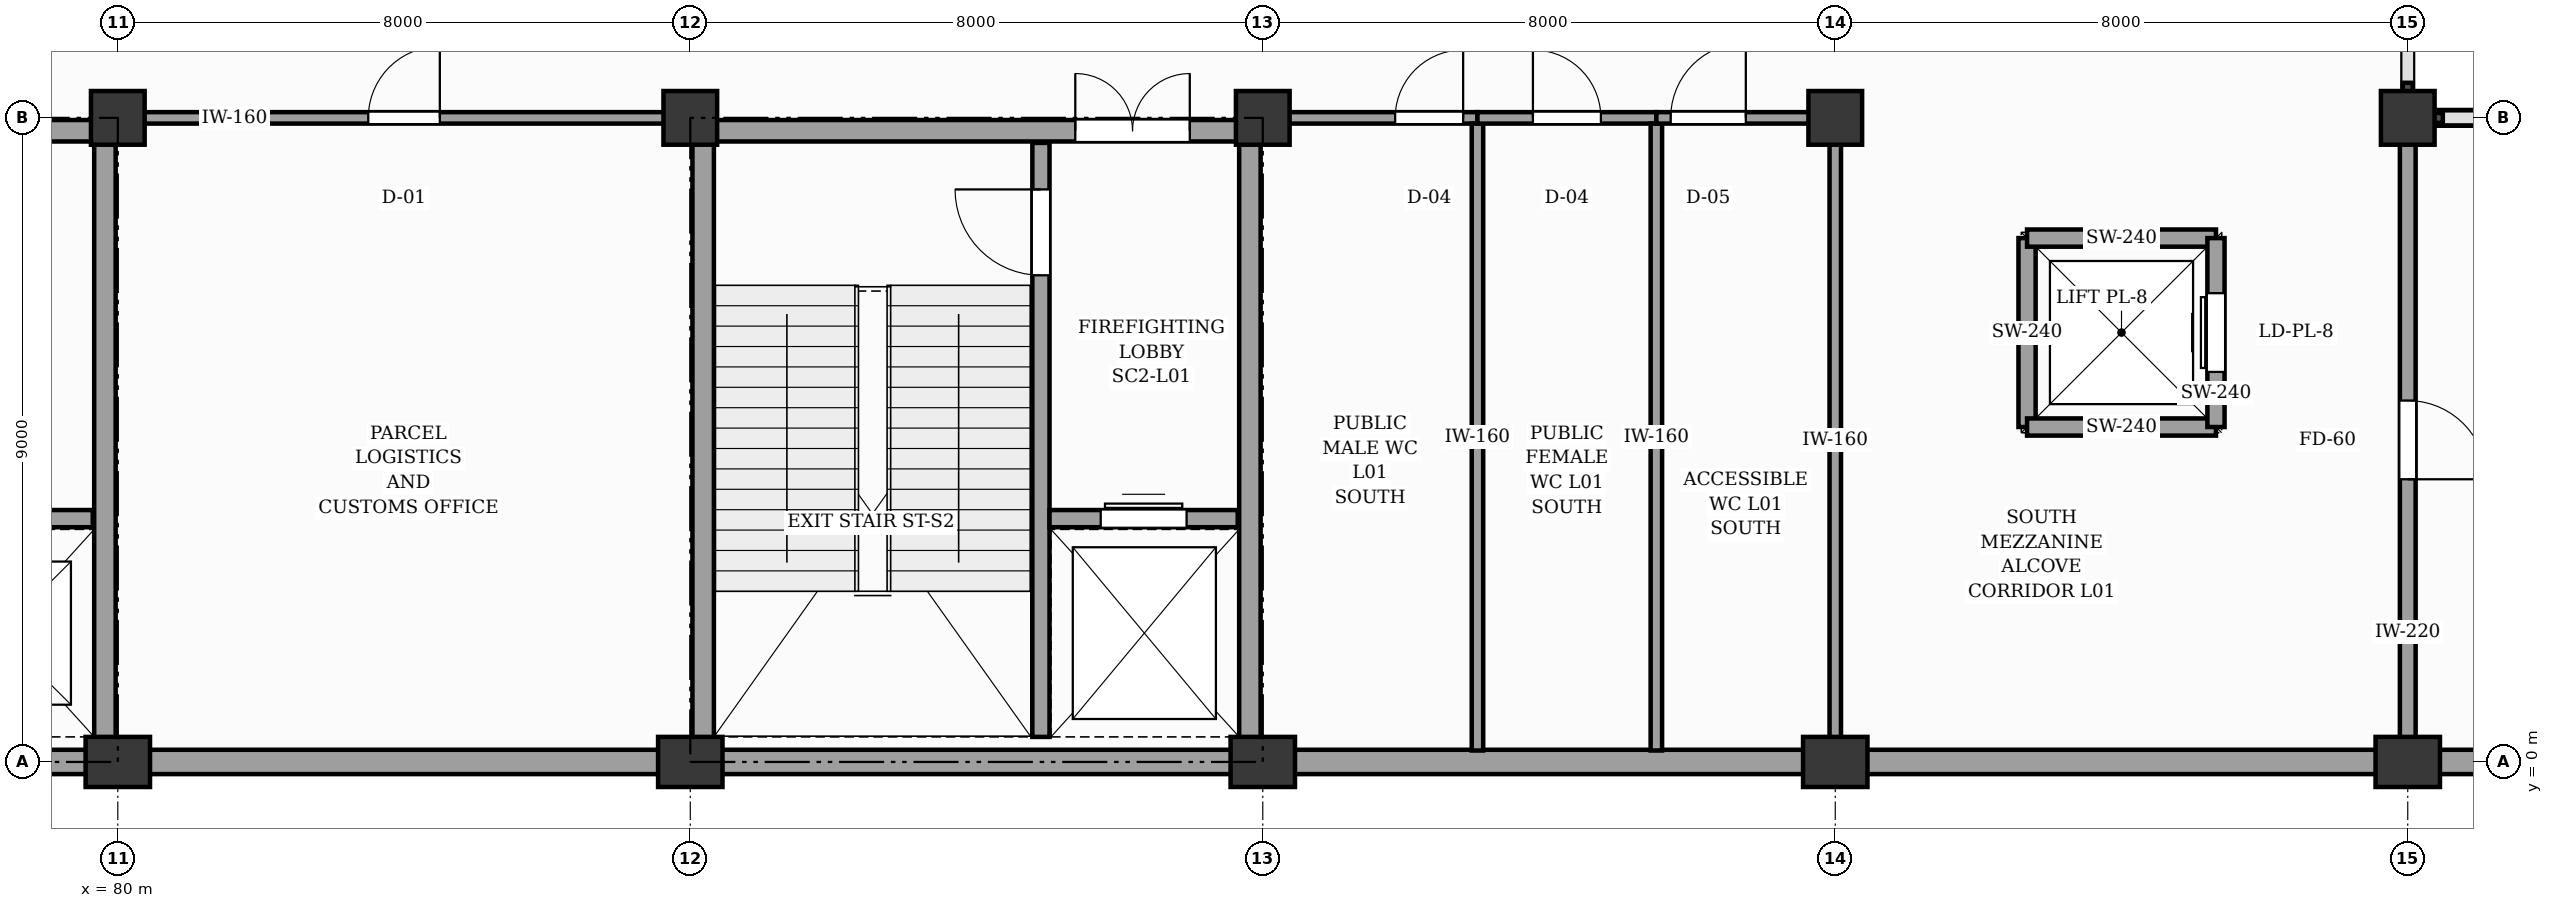
"""IFC4 building model, lengths in metres.
Left out: names, types, materials, properties, quantities, classifications, styles, units other than length and angle.
Written with IfcOpenShell. Run it as: python <this file> out.ifc"""

import sys

from ifc_helpers import new_model, si_unit, direction, frame, frame_2d, origin, origin_2d, place, context, subcontext, project, spatial, rectangle, extrude, element, fill, save


model = new_model("IFC4")
c1 = context("Model", 3, precision=1e-05, world=origin(), true_north=direction((0.0, 1.0)))
c2 = subcontext(c1, "Body", "Model", "MODEL_VIEW")
j1 = project(units=[si_unit("LENGTHUNIT", "METRE"), si_unit("PLANEANGLEUNIT", "RADIAN")], contexts=[c1])
p1 = place(None, origin())
s1 = spatial("IfcSite", under=j1, at=p1, CompositionType="ELEMENT")
p2 = place(p1, origin())
s2 = spatial("IfcBuilding", under=s1, at=p2, CompositionType="ELEMENT")
p3 = place(p2, frame((0.0, 0.0, 4.8)))
s3 = spatial("IfcBuildingStorey", under=s2, at=p3, CompositionType="ELEMENT", Elevation=4.8)
p4 = place(p3, frame((80.0, 0.0, 0.0), z_axis=(0.0, 0.0, 1.0), x_axis=(1.0, 0.0, 0.0)))
e1 = element("IfcColumn", 1, at=p4, inside=s3, PredefinedType="PILASTER", context=c2, shape_type="SweptSolid", body=[
    extrude(rectangle(XDim=0.9, YDim=0.7, at=origin_2d()), origin(), (0.0, 0.0, 1.0), 4.8),
])
p5 = place(p3, frame((80.0, 9.0, 0.0), z_axis=(0.0, 0.0, 1.0), x_axis=(1.0, 0.0, 0.0)))
e2 = element("IfcColumn", 2, at=p5, inside=s3, PredefinedType="COLUMN", context=c2, shape_type="SweptSolid", body=[
    extrude(rectangle(XDim=0.75, YDim=0.75, at=origin_2d()), origin(), (0.0, 0.0, 1.0), 4.8),
])
p6 = place(p3, frame((88.0, 0.0, 0.0), z_axis=(0.0, 0.0, 1.0), x_axis=(1.0, 0.0, 0.0)))
e3 = element("IfcColumn", 3, at=p6, inside=s3, PredefinedType="PILASTER", context=c2, shape_type="SweptSolid", body=[
    extrude(rectangle(XDim=0.9, YDim=0.7, at=origin_2d()), origin(), (0.0, 0.0, 1.0), 4.8),
])
p7 = place(p3, frame((88.0, 9.0, 0.0), z_axis=(0.0, 0.0, 1.0), x_axis=(1.0, 0.0, 0.0)))
e4 = element("IfcColumn", 4, at=p7, inside=s3, PredefinedType="COLUMN", context=c2, shape_type="SweptSolid", body=[
    extrude(rectangle(XDim=0.75, YDim=0.75, at=origin_2d()), origin(), (0.0, 0.0, 1.0), 4.8),
])
p8 = place(p3, frame((96.0, 0.0, 0.0), z_axis=(0.0, 0.0, 1.0), x_axis=(1.0, 0.0, 0.0)))
e5 = element("IfcColumn", 5, at=p8, inside=s3, PredefinedType="PILASTER", context=c2, shape_type="SweptSolid", body=[
    extrude(rectangle(XDim=0.9, YDim=0.7, at=origin_2d()), origin(), (0.0, 0.0, 1.0), 4.8),
])
p9 = place(p3, frame((96.0, 9.0, 0.0), z_axis=(0.0, 0.0, 1.0), x_axis=(1.0, 0.0, 0.0)))
e6 = element("IfcColumn", 6, at=p9, inside=s3, PredefinedType="COLUMN", context=c2, shape_type="SweptSolid", body=[
    extrude(rectangle(XDim=0.75, YDim=0.75, at=origin_2d()), origin(), (0.0, 0.0, 1.0), 4.8),
])
p10 = place(p3, frame((104.0, 0.0, 0.0), z_axis=(0.0, 0.0, 1.0), x_axis=(1.0, 0.0, 0.0)))
e7 = element("IfcColumn", 7, at=p10, inside=s3, PredefinedType="PILASTER", context=c2, shape_type="SweptSolid", body=[
    extrude(rectangle(XDim=0.9, YDim=0.7, at=origin_2d()), origin(), (0.0, 0.0, 1.0), 4.8),
])
p11 = place(p3, frame((104.0, 9.0, 0.0), z_axis=(0.0, 0.0, 1.0), x_axis=(1.0, 0.0, 0.0)))
e8 = element("IfcColumn", 8, at=p11, inside=s3, PredefinedType="COLUMN", context=c2, shape_type="SweptSolid", body=[
    extrude(rectangle(XDim=0.75, YDim=0.75, at=origin_2d()), origin(), (0.0, 0.0, 1.0), 4.8),
])
p12 = place(p3, frame((112.0, 0.0, 0.0), z_axis=(0.0, 0.0, 1.0), x_axis=(1.0, 0.0, 0.0)))
e9 = element("IfcColumn", 9, at=p12, inside=s3, PredefinedType="PILASTER", context=c2, shape_type="SweptSolid", body=[
    extrude(rectangle(XDim=0.9, YDim=0.7, at=origin_2d()), origin(), (0.0, 0.0, 1.0), 4.8),
])
p13 = place(p3, frame((112.0, 9.0, 0.0), z_axis=(0.0, 0.0, 1.0), x_axis=(1.0, 0.0, 0.0)))
e10 = element("IfcColumn", 10, at=p13, inside=s3, PredefinedType="COLUMN", context=c2, shape_type="SweptSolid", body=[
    extrude(rectangle(XDim=0.75, YDim=0.75, at=origin_2d()), origin(), (0.0, 0.0, 1.0), 4.8),
])
for number, where, z_axis, x_axis in (
    (11, (72.4, 0.0, 0.0), (0.0, 0.0, 1.0), (1.0, 0.0, 0.0)),
    (12, (80.4, 0.0, 0.0), (0.0, 0.0, 1.0), (1.0, 0.0, 0.0)),
    (13, (88.4, 0.0, 0.0), (0.0, 0.0, 1.0), (1.0, 0.0, 0.0)),
    (14, (96.4, 0.0, 0.0), (0.0, 0.0, 1.0), (1.0, 0.0, 0.0)),
    (15, (104.4, 0.0, 0.0), (0.0, 0.0, 1.0), (1.0, 0.0, 0.0)),
):
    element("IfcWall", number, at=place(p3, frame(where, z_axis=z_axis, x_axis=x_axis)), inside=s3, PredefinedType="SOLIDWALL", context=c2, shape_type="SweptSolid", body=[
        extrude(rectangle(XDim=7.2, YDim=0.34, at=frame_2d((3.6, 0.0))), origin(), (0.0, 0.0, 1.0), 3.84),
    ])
p14 = place(p3, frame((112.4, 0.0, 0.0), z_axis=(0.0, 0.0, 1.0), x_axis=(1.0, 0.0, 0.0)))
e16 = element("IfcWall", 16, at=p14, inside=s3, PredefinedType="SOLIDWALL", context=c2, shape_type="SweptSolid", body=[
    extrude(rectangle(XDim=7.2, YDim=0.34, at=frame_2d((3.6, 0.0))), origin(), (0.0, 0.0, 1.0), 3.08),
])
p15 = place(p3, frame((92.9, 0.35, 0.0), z_axis=(0.0, 0.0, 1.0), x_axis=(0.0, 1.0, 0.0)))
e17 = element("IfcWall", 17, at=p15, inside=s3, PredefinedType="SHEAR", context=c2, shape_type="SweptSolid", body=[
    extrude(rectangle(XDim=8.3, YDim=0.24, at=frame_2d((4.15, 0.0))), origin(), (0.0, 0.0, 1.0), 4.52),
])
p16 = place(p15, frame((6.45, 0.0, 0.0)))
e18 = element("IfcOpeningElement", 18, at=p16, cuts=e17, PredefinedType="OPENING", context=c2, shape_type="SweptSolid", body=[
    extrude(rectangle(XDim=1.2, YDim=2.15, at=frame_2d((0.6, 1.075))), frame((0.0, 0.13, 0.0), z_axis=(0.0, -1.0, 0.0), x_axis=(1.0, 0.0, 0.0)), (0.0, 0.0, 1.0), 0.26),
])
p17 = place(p3, frame((93.02, 3.4, 0.0), z_axis=(0.0, 0.0, 1.0), x_axis=(1.0, 0.0, 0.0)))
e19 = element("IfcWall", 19, at=p17, inside=s3, PredefinedType="SHEAR", context=c2, shape_type="SweptSolid", body=[
    extrude(rectangle(XDim=2.63, YDim=0.24, at=frame_2d((1.315, 0.0))), origin(), (0.0, 0.0, 1.0), 4.52),
])
p18 = place(p17, frame((0.715, 0.0, 0.0)))
e20 = element("IfcOpeningElement", 20, at=p18, cuts=e19, PredefinedType="OPENING", context=c2, shape_type="SweptSolid", body=[
    extrude(rectangle(XDim=1.2, YDim=2.15, at=frame_2d((0.6, 1.075))), frame((0.0, 0.13, 0.0), z_axis=(0.0, -1.0, 0.0), x_axis=(1.0, 0.0, 0.0)), (0.0, 0.0, 1.0), 0.26),
])
for number, where, z_axis, x_axis in (
    (21, (88.18, 0.18, 0.0), (0.0, 0.0, 1.0), (0.0, 1.0, 0.0)),
    (22, (95.82, 0.18, 0.0), (0.0, 0.0, 1.0), (0.0, 1.0, 0.0)),
):
    element("IfcWall", number, at=place(p3, frame(where, z_axis=z_axis, x_axis=x_axis)), inside=s3, PredefinedType="SHEAR", context=c2, shape_type="SweptSolid", body=[
        extrude(rectangle(XDim=8.64, YDim=0.3, at=frame_2d((4.32, 0.0))), origin(), (0.0, 0.0, 1.0), 4.52),
    ])
p19 = place(p3, frame((88.03, 8.82, 0.0), z_axis=(0.0, 0.0, 1.0), x_axis=(1.0, 0.0, 0.0)))
e23 = element("IfcWall", 23, at=p19, inside=s3, PredefinedType="SHEAR", context=c2, shape_type="SweptSolid", body=[
    extrude(rectangle(XDim=7.94, YDim=0.3, at=frame_2d((3.97, 0.0))), origin(), (0.0, 0.0, 1.0), 4.52),
])
p20 = place(p19, frame((5.35, 0.0, 0.0)))
e24 = element("IfcOpeningElement", 24, at=p20, cuts=e23, PredefinedType="OPENING", context=c2, shape_type="SweptSolid", body=[
    extrude(rectangle(XDim=1.6, YDim=2.15, at=frame_2d((0.8, 1.075))), frame((0.0, 0.16, 0.0), z_axis=(0.0, -1.0, 0.0), x_axis=(1.0, 0.0, 0.0)), (0.0, 0.0, 1.0), 0.32),
])
p21 = place(p3, frame((77.02, 3.4, 0.0), z_axis=(0.0, 0.0, 1.0), x_axis=(1.0, 0.0, 0.0)))
e25 = element("IfcWall", 25, at=p21, inside=s3, PredefinedType="SHEAR", context=c2, shape_type="SweptSolid", body=[
    extrude(rectangle(XDim=2.63, YDim=0.24, at=frame_2d((1.315, 0.0))), origin(), (0.0, 0.0, 1.0), 4.52),
])
p22 = place(p21, frame((0.765, 0.0, 0.0)))
e26 = element("IfcOpeningElement", 26, at=p22, cuts=e25, PredefinedType="OPENING", context=c2, shape_type="SweptSolid", body=[
    extrude(rectangle(XDim=1.1, YDim=2.15, at=frame_2d((0.55, 1.075))), frame((0.0, 0.13, 0.0), z_axis=(0.0, -1.0, 0.0), x_axis=(1.0, 0.0, 0.0)), (0.0, 0.0, 1.0), 0.26),
])
p23 = place(p3, frame((79.82, 0.18, 0.0), z_axis=(0.0, 0.0, 1.0), x_axis=(0.0, 1.0, 0.0)))
e27 = element("IfcWall", 27, at=p23, inside=s3, PredefinedType="SHEAR", context=c2, shape_type="SweptSolid", body=[
    extrude(rectangle(XDim=8.64, YDim=0.3, at=frame_2d((4.32, 0.0))), origin(), (0.0, 0.0, 1.0), 4.52),
])
p24 = place(p3, frame((72.03, 8.82, 0.0), z_axis=(0.0, 0.0, 1.0), x_axis=(1.0, 0.0, 0.0)))
e28 = element("IfcWall", 28, at=p24, inside=s3, PredefinedType="SHEAR", context=c2, shape_type="SweptSolid", body=[
    extrude(rectangle(XDim=7.94, YDim=0.3, at=frame_2d((3.97, 0.0))), origin(), (0.0, 0.0, 1.0), 4.52),
])
p25 = place(p24, frame((5.35, 0.0, 0.0)))
e29 = element("IfcOpeningElement", 29, at=p25, cuts=e28, PredefinedType="OPENING", context=c2, shape_type="SweptSolid", body=[
    extrude(rectangle(XDim=1.6, YDim=2.15, at=frame_2d((0.8, 1.075))), frame((0.0, 0.16, 0.0), z_axis=(0.0, -1.0, 0.0), x_axis=(1.0, 0.0, 0.0)), (0.0, 0.0, 1.0), 0.32),
])
for number, where, z_axis, x_axis in (
    (30, (106.68, 4.68, 0.0), (0.0, 0.0, 1.0), (0.0, 1.0, 0.0)),
    (31, (106.68, 4.68, 0.0), (0.0, 0.0, 1.0), (1.0, 0.0, 0.0)),
    (32, (106.68, 7.32, 0.0), (0.0, 0.0, 1.0), (1.0, 0.0, 0.0)),
):
    element("IfcWall", number, at=place(p3, frame(where, z_axis=z_axis, x_axis=x_axis)), inside=s3, PredefinedType="SHEAR", context=c2, shape_type="SweptSolid", body=[
        extrude(rectangle(XDim=2.64, YDim=0.24, at=frame_2d((1.32, 0.0))), origin(), (0.0, 0.0, 1.0), 4.55),
    ])
p26 = place(p3, frame((109.32, 4.68, 0.0), z_axis=(0.0, 0.0, 1.0), x_axis=(0.0, 1.0, 0.0)))
e33 = element("IfcWall", 33, at=p26, inside=s3, PredefinedType="SHEAR", context=c2, shape_type="SweptSolid", body=[
    extrude(rectangle(XDim=2.64, YDim=0.24, at=frame_2d((1.32, 0.0))), origin(), (0.0, 0.0, 1.0), 4.55),
])
p27 = place(p26, frame((0.77, 0.0, 0.0)))
e34 = element("IfcOpeningElement", 34, at=p27, cuts=e33, PredefinedType="OPENING", context=c2, shape_type="SweptSolid", body=[
    extrude(rectangle(XDim=1.1, YDim=2.15, at=frame_2d((0.55, 1.075))), frame((0.0, 0.13, 0.0), z_axis=(0.0, -1.0, 0.0), x_axis=(1.0, 0.0, 0.0)), (0.0, 0.0, 1.0), 0.26),
])
p28 = place(p3, frame((80.3, 9.0, 0.0), z_axis=(0.0, 0.0, 1.0), x_axis=(1.0, 0.0, 0.0)))
e35 = element("IfcWall", 35, at=p28, inside=s3, PredefinedType="PARTITIONING", context=c2, shape_type="SweptSolid", body=[
    extrude(rectangle(XDim=7.4, YDim=0.16, at=frame_2d((3.7, 0.0))), origin(), (0.0, 0.0, 1.0), 3.66),
])
p29 = place(p28, frame((3.2, 0.0, 0.0)))
e36 = element("IfcOpeningElement", 36, at=p29, cuts=e35, PredefinedType="OPENING", context=c2, shape_type="SweptSolid", body=[
    extrude(rectangle(XDim=1.0, YDim=2.1, at=frame_2d((0.5, 1.05))), frame((0.0, 0.09, 0.0), z_axis=(0.0, -1.0, 0.0), x_axis=(1.0, 0.0, 0.0)), (0.0, 0.0, 1.0), 0.18),
])
p30 = place(p3, frame((96.3, 9.0, 0.0), z_axis=(0.0, 0.0, 1.0), x_axis=(1.0, 0.0, 0.0)))
e37 = element("IfcWall", 37, at=p30, inside=s3, PredefinedType="PARTITIONING", context=c2, shape_type="SweptSolid", body=[
    extrude(rectangle(XDim=2.7, YDim=0.16, at=frame_2d((1.35, 0.0))), origin(), (0.0, 0.0, 1.0), 3.66),
])
p31 = place(p30, frame((1.55, 0.0, 0.0)))
e38 = element("IfcOpeningElement", 38, at=p31, cuts=e37, PredefinedType="OPENING", context=c2, shape_type="SweptSolid", body=[
    extrude(rectangle(XDim=0.95, YDim=2.1, at=frame_2d((0.475, 1.05))), frame((0.0, 0.09, 0.0), z_axis=(0.0, -1.0, 0.0), x_axis=(1.0, 0.0, 0.0)), (0.0, 0.0, 1.0), 0.18),
])
p32 = place(p3, frame((99.0, 0.16, 0.0), z_axis=(0.0, 0.0, 1.0), x_axis=(0.0, 1.0, 0.0)))
e39 = element("IfcWall", 39, at=p32, inside=s3, PredefinedType="PARTITIONING", context=c2, shape_type="SweptSolid", body=[
    extrude(rectangle(XDim=8.76, YDim=0.16, at=frame_2d((4.38, 0.0))), origin(), (0.0, 0.0, 1.0), 3.66),
])
p33 = place(p3, frame((99.0, 9.0, 0.0), z_axis=(0.0, 0.0, 1.0), x_axis=(1.0, 0.0, 0.0)))
e40 = element("IfcWall", 40, at=p33, inside=s3, PredefinedType="PARTITIONING", context=c2, shape_type="SweptSolid", body=[
    extrude(rectangle(XDim=2.5, YDim=0.16, at=frame_2d((1.25, 0.0))), origin(), (0.0, 0.0, 1.0), 3.66),
])
p34 = place(p33, frame((0.775, 0.0, 0.0)))
e41 = element("IfcOpeningElement", 41, at=p34, cuts=e40, PredefinedType="OPENING", context=c2, shape_type="SweptSolid", body=[
    extrude(rectangle(XDim=0.95, YDim=2.1, at=frame_2d((0.475, 1.05))), frame((0.0, 0.09, 0.0), z_axis=(0.0, -1.0, 0.0), x_axis=(1.0, 0.0, 0.0)), (0.0, 0.0, 1.0), 0.18),
])
p35 = place(p3, frame((101.5, 0.16, 0.0), z_axis=(0.0, 0.0, 1.0), x_axis=(0.0, 1.0, 0.0)))
e42 = element("IfcWall", 42, at=p35, inside=s3, PredefinedType="PARTITIONING", context=c2, shape_type="SweptSolid", body=[
    extrude(rectangle(XDim=8.76, YDim=0.16, at=frame_2d((4.38, 0.0))), origin(), (0.0, 0.0, 1.0), 3.66),
])
p36 = place(p3, frame((101.5, 9.0, 0.0), z_axis=(0.0, 0.0, 1.0), x_axis=(1.0, 0.0, 0.0)))
e43 = element("IfcWall", 43, at=p36, inside=s3, PredefinedType="PARTITIONING", context=c2, shape_type="SweptSolid", body=[
    extrude(rectangle(XDim=2.2, YDim=0.16, at=frame_2d((1.1, 0.0))), origin(), (0.0, 0.0, 1.0), 3.66),
])
p37 = place(p36, frame((0.2, 0.0, 0.0)))
e44 = element("IfcOpeningElement", 44, at=p37, cuts=e43, PredefinedType="OPENING", context=c2, shape_type="SweptSolid", body=[
    extrude(rectangle(XDim=1.05, YDim=2.1, at=frame_2d((0.525, 1.05))), frame((0.0, 0.09, 0.0), z_axis=(0.0, -1.0, 0.0), x_axis=(1.0, 0.0, 0.0)), (0.0, 0.0, 1.0), 0.18),
])
p38 = place(p3, frame((104.0, 0.3, 0.0), z_axis=(0.0, 0.0, 1.0), x_axis=(0.0, 1.0, 0.0)))
e45 = element("IfcWall", 45, at=p38, inside=s3, PredefinedType="PARTITIONING", context=c2, shape_type="SweptSolid", body=[
    extrude(rectangle(XDim=8.4, YDim=0.16, at=frame_2d((4.2, 0.0))), origin(), (0.0, 0.0, 1.0), 3.66),
])
p39 = place(p3, frame((112.3, 9.0, 0.0), z_axis=(0.0, 0.0, 1.0), x_axis=(1.0, 0.0, 0.0)))
e46 = element("IfcWall", 46, at=p39, inside=s3, PredefinedType="SOLIDWALL", context=c2, shape_type="SweptSolid", body=[
    extrude(rectangle(XDim=7.4, YDim=0.22, at=frame_2d((3.7, 0.0))), origin(), (0.0, 0.0, 1.0), 2.83),
])
p40 = place(p3, frame((112.0, 0.3, 0.0), z_axis=(0.0, 0.0, 1.0), x_axis=(0.0, 1.0, 0.0)))
e47 = element("IfcWall", 47, at=p40, inside=s3, PredefinedType="SOLIDWALL", context=c2, shape_type="SweptSolid", body=[
    extrude(rectangle(XDim=8.4, YDim=0.22, at=frame_2d((4.2, 0.0))), origin(), (0.0, 0.0, 1.0), 3.66),
])
p41 = place(p40, frame((3.65, 0.0, 0.0)))
e48 = element("IfcOpeningElement", 48, at=p41, cuts=e47, PredefinedType="OPENING", context=c2, shape_type="SweptSolid", body=[
    extrude(rectangle(XDim=1.1, YDim=2.15, at=frame_2d((0.55, 1.075))), frame((0.0, 0.12, 0.0), z_axis=(0.0, -1.0, 0.0), x_axis=(1.0, 0.0, 0.0)), (0.0, 0.0, 1.0), 0.24),
])
p42 = place(p16, origin())
e49 = element("IfcDoor", 49, at=p42, inside=s3, OperationType="SINGLE_SWING_RIGHT", PredefinedType="DOOR", context=c2, shape_type="SweptSolid", body=[
    extrude(rectangle(XDim=1.2, YDim=2.15, at=frame_2d((0.6, 1.075))), frame((0.0, 0.025, 0.0), z_axis=(0.0, -1.0, 0.0), x_axis=(1.0, 0.0, 0.0)), (0.0, 0.0, 1.0), 0.05),
])
fill(e18, e49)
p43 = place(p18, origin())
e50 = element("IfcDoor", 50, at=p43, inside=s3, OperationType="DOUBLE_DOOR_SLIDING", PredefinedType="DOOR", context=c2, shape_type="SweptSolid", body=[
    extrude(rectangle(XDim=1.2, YDim=2.15, at=frame_2d((0.6, 1.075))), frame((0.0, 0.025, 0.0), z_axis=(0.0, -1.0, 0.0), x_axis=(1.0, 0.0, 0.0)), (0.0, 0.0, 1.0), 0.05),
])
fill(e20, e50)
p44 = place(p20, origin())
e51 = element("IfcDoor", 51, at=p44, inside=s3, OperationType="DOUBLE_DOOR_SINGLE_SWING", PredefinedType="DOOR", context=c2, shape_type="SweptSolid", body=[
    extrude(rectangle(XDim=1.6, YDim=2.15, at=frame_2d((0.8, 1.075))), frame((0.0, 0.025, 0.0), z_axis=(0.0, -1.0, 0.0), x_axis=(1.0, 0.0, 0.0)), (0.0, 0.0, 1.0), 0.05),
])
fill(e24, e51)
p45 = place(p27, origin())
e52 = element("IfcDoor", 52, at=p45, inside=s3, OperationType="DOUBLE_DOOR_SLIDING", PredefinedType="DOOR", context=c2, shape_type="SweptSolid", body=[
    extrude(rectangle(XDim=1.1, YDim=2.15, at=frame_2d((0.55, 1.075))), frame((0.0, 0.025, 0.0), z_axis=(0.0, -1.0, 0.0), x_axis=(1.0, 0.0, 0.0)), (0.0, 0.0, 1.0), 0.05),
])
fill(e34, e52)
p46 = place(p29, origin())
e53 = element("IfcDoor", 53, at=p46, inside=s3, OperationType="SINGLE_SWING_RIGHT", PredefinedType="DOOR", context=c2, shape_type="SweptSolid", body=[
    extrude(rectangle(XDim=1.0, YDim=2.1, at=frame_2d((0.5, 1.05))), frame((0.0, 0.025, 0.0), z_axis=(0.0, -1.0, 0.0), x_axis=(1.0, 0.0, 0.0)), (0.0, 0.0, 1.0), 0.05),
])
fill(e36, e53)
p47 = place(p31, origin())
e54 = element("IfcDoor", 54, at=p47, inside=s3, OperationType="SINGLE_SWING_RIGHT", PredefinedType="DOOR", context=c2, shape_type="SweptSolid", body=[
    extrude(rectangle(XDim=0.95, YDim=2.1, at=frame_2d((0.475, 1.05))), frame((0.0, 0.025, 0.0), z_axis=(0.0, -1.0, 0.0), x_axis=(1.0, 0.0, 0.0)), (0.0, 0.0, 1.0), 0.05),
])
fill(e38, e54)
p48 = place(p34, origin())
e55 = element("IfcDoor", 55, at=p48, inside=s3, OperationType="SINGLE_SWING_LEFT", PredefinedType="DOOR", context=c2, shape_type="SweptSolid", body=[
    extrude(rectangle(XDim=0.95, YDim=2.1, at=frame_2d((0.475, 1.05))), frame((0.0, 0.025, 0.0), z_axis=(0.0, -1.0, 0.0), x_axis=(1.0, 0.0, 0.0)), (0.0, 0.0, 1.0), 0.05),
])
fill(e41, e55)
p49 = place(p37, origin())
e56 = element("IfcDoor", 56, at=p49, inside=s3, OperationType="SINGLE_SWING_RIGHT", PredefinedType="DOOR", context=c2, shape_type="SweptSolid", body=[
    extrude(rectangle(XDim=1.05, YDim=2.1, at=frame_2d((0.525, 1.05))), frame((0.0, 0.025, 0.0), z_axis=(0.0, -1.0, 0.0), x_axis=(1.0, 0.0, 0.0)), (0.0, 0.0, 1.0), 0.05),
])
fill(e44, e56)
p50 = place(p41, frame((1.1, 0.0, 0.0), z_axis=(0.0, 0.0, 1.0), x_axis=(-1.0, 0.0, 0.0)))
e57 = element("IfcDoor", 57, at=p50, inside=s3, OperationType="SINGLE_SWING_LEFT", PredefinedType="DOOR", context=c2, shape_type="SweptSolid", body=[
    extrude(rectangle(XDim=1.1, YDim=2.15, at=frame_2d((0.55, 1.075))), frame((0.0, 0.025, 0.0), z_axis=(0.0, -1.0, 0.0), x_axis=(1.0, 0.0, 0.0)), (0.0, 0.0, 1.0), 0.05),
])
fill(e48, e57)
save(model, sys.argv[1])
